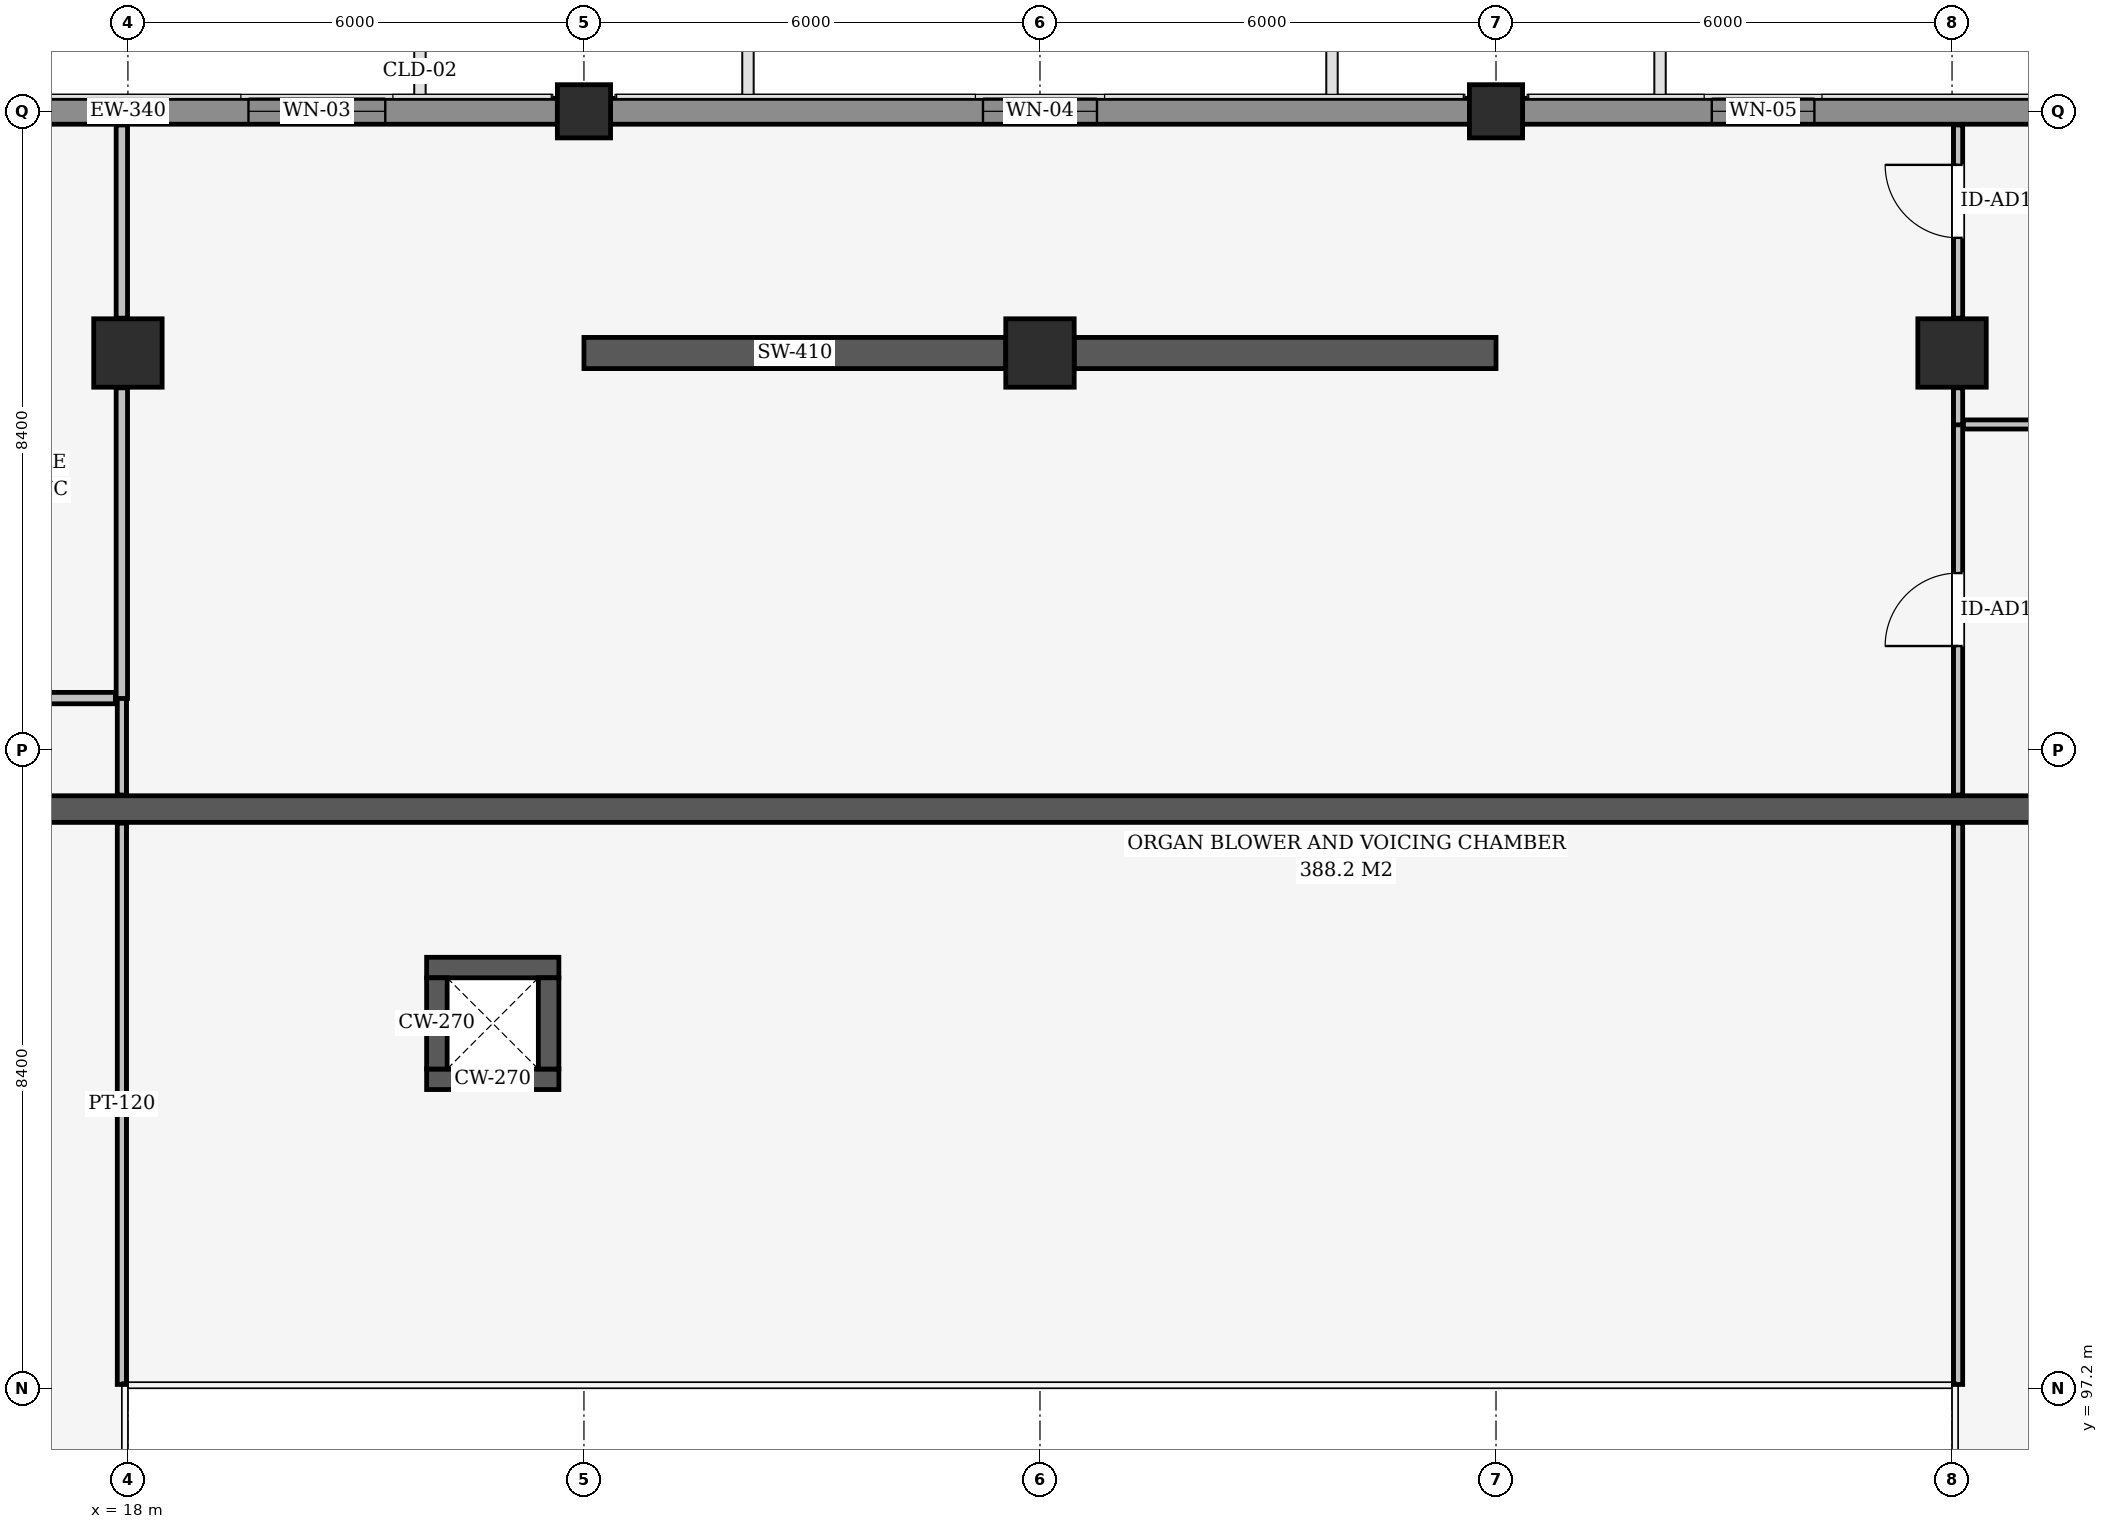
"""IFC4 building model, lengths in metres.
Left out: names, types, materials, properties, quantities, classifications, styles, units other than length and angle.
Written with IfcOpenShell. Run it as: python <this file> out.ifc"""

import sys

from ifc_helpers import new_model, si_unit, direction, frame, frame_2d, origin, origin_2d, place, context, subcontext, project, spatial, rectangle, extrude, element, fill, save


model = new_model("IFC4")
c1 = context("Model", 3, precision=1e-05, world=origin(), true_north=direction((0.0, 1.0)))
c2 = subcontext(c1, "Body", "Model", "MODEL_VIEW")
j1 = project(units=[si_unit("LENGTHUNIT", "METRE"), si_unit("PLANEANGLEUNIT", "RADIAN")], contexts=[c1])
p1 = place(None, origin())
s1 = spatial("IfcSite", under=j1, at=p1, CompositionType="ELEMENT")
p2 = place(p1, origin())
s2 = spatial("IfcBuilding", under=s1, at=p2, CompositionType="ELEMENT")
p3 = place(p2, frame((0.0, 0.0, 18.3)))
s3 = spatial("IfcBuildingStorey", under=s2, at=p3, CompositionType="ELEMENT", Elevation=18.3)
for number, where, z_axis, x_axis in (
    (1, (24.0, 114.0, 0.0), (0.0, 0.0, 1.0), (1.0, 0.0, 0.0)),
    (2, (36.0, 114.0, 0.0), (0.0, 0.0, 1.0), (1.0, 0.0, 0.0)),
):
    element("IfcColumn", number, at=place(p3, frame(where, z_axis=z_axis, x_axis=x_axis)), inside=s3, PredefinedType="COLUMN", context=c2, shape_type="SweptSolid", body=[
        extrude(rectangle(XDim=0.7, YDim=0.7, at=origin_2d()), origin(), (0.0, 0.0, 1.0), 3.9),
    ])
for number, where, z_axis, x_axis in (
    (3, (18.0, 110.82, 0.0), (0.0, 0.0, 1.0), (1.0, 0.0, 0.0)),
    (4, (30.0, 110.82, 0.0), (0.0, 0.0, 1.0), (1.0, 0.0, 0.0)),
    (5, (42.0, 110.82, 0.0), (0.0, 0.0, 1.0), (1.0, 0.0, 0.0)),
):
    element("IfcColumn", number, at=place(p3, frame(where, z_axis=z_axis, x_axis=x_axis)), inside=s3, PredefinedType="COLUMN", context=c2, shape_type="SweptSolid", body=[
        extrude(rectangle(XDim=0.9, YDim=0.9, at=origin_2d()), origin(), (0.0, 0.0, 1.0), 2.3),
    ])
p4 = place(p3, frame((12.005, 104.82, 0.0), z_axis=(0.0, 0.0, 1.0), x_axis=(1.0, 0.0, 0.0)))
e6 = element("IfcWall", 6, at=p4, inside=s3, PredefinedType="SHEAR", context=c2, shape_type="SweptSolid", body=[
    extrude(rectangle(XDim=35.99, YDim=0.35, at=frame_2d((17.995, 0.0))), origin(), (0.0, 0.0, 1.0), 2.39),
])
for number, where, z_axis, x_axis in (
    (7, (24.0, 110.82, 0.0), (0.0, 0.0, 1.0), (1.0, 0.0, 0.0)),
    (8, (30.45, 110.82, 0.0), (0.0, 0.0, 1.0), (1.0, 0.0, 0.0)),
):
    element("IfcWall", number, at=place(p3, frame(where, z_axis=z_axis, x_axis=x_axis)), inside=s3, PredefinedType="SHEAR", context=c2, shape_type="SweptSolid", body=[
        extrude(rectangle(XDim=5.55, YDim=0.41, at=frame_2d((2.775, 0.0))), origin(), (0.0, 0.0, 1.0), 2.3),
    ])
p5 = place(p3, frame((12.35, 114.0, 0.0), z_axis=(0.0, 0.0, 1.0), x_axis=(1.0, 0.0, 0.0)))
e9 = element("IfcWall", 9, at=p5, inside=s3, PredefinedType="SOLIDWALL", context=c2, shape_type="SweptSolid", body=[
    extrude(rectangle(XDim=11.3, YDim=0.34, at=frame_2d((5.65, 0.0))), origin(), (0.0, 0.0, 1.0), 3.9),
])
p6 = place(p5, frame((7.236, 0.0, 0.85)))
e10 = element("IfcOpeningElement", 10, at=p6, cuts=e9, PredefinedType="OPENING", context=c2, shape_type="SweptSolid", body=[
    extrude(rectangle(XDim=1.8, YDim=1.65, at=frame_2d((0.9, 0.825))), frame((0.0, 0.18, 0.0), z_axis=(0.0, -1.0, 0.0), x_axis=(1.0, 0.0, 0.0)), (0.0, 0.0, 1.0), 0.36),
])
p7 = place(p3, frame((24.35, 114.0, 0.0), z_axis=(0.0, 0.0, 1.0), x_axis=(1.0, 0.0, 0.0)))
e11 = element("IfcWall", 11, at=p7, inside=s3, PredefinedType="SOLIDWALL", context=c2, shape_type="SweptSolid", body=[
    extrude(rectangle(XDim=11.3, YDim=0.34, at=frame_2d((5.65, 0.0))), origin(), (0.0, 0.0, 1.0), 3.9),
])
p8 = place(p7, frame((4.9, 0.0, 0.85)))
e12 = element("IfcOpeningElement", 12, at=p8, cuts=e11, PredefinedType="OPENING", context=c2, shape_type="SweptSolid", body=[
    extrude(rectangle(XDim=1.5, YDim=1.65, at=frame_2d((0.75, 0.825))), frame((0.0, 0.18, 0.0), z_axis=(0.0, -1.0, 0.0), x_axis=(1.0, 0.0, 0.0)), (0.0, 0.0, 1.0), 0.36),
])
p9 = place(p3, frame((36.35, 114.0, 0.0), z_axis=(0.0, 0.0, 1.0), x_axis=(1.0, 0.0, 0.0)))
e13 = element("IfcWall", 13, at=p9, inside=s3, PredefinedType="SOLIDWALL", context=c2, shape_type="SweptSolid", body=[
    extrude(rectangle(XDim=11.3, YDim=0.34, at=frame_2d((5.65, 0.0))), origin(), (0.0, 0.0, 1.0), 3.9),
])
p10 = place(p9, frame((2.489, 0.0, 0.85)))
e14 = element("IfcOpeningElement", 14, at=p10, cuts=e13, PredefinedType="OPENING", context=c2, shape_type="SweptSolid", body=[
    extrude(rectangle(XDim=1.35, YDim=1.5, at=frame_2d((0.675, 0.75))), frame((0.0, 0.18, 0.0), z_axis=(0.0, -1.0, 0.0), x_axis=(1.0, 0.0, 0.0)), (0.0, 0.0, 1.0), 0.36),
])
for number, where, z_axis, x_axis in (
    (15, (21.93, 101.265, 0.0), (0.0, 0.0, 1.0), (1.0, 0.0, 0.0)),
    (16, (21.93, 102.735, 0.0), (0.0, 0.0, 1.0), (1.0, 0.0, 0.0)),
):
    element("IfcWall", number, at=place(p3, frame(where, z_axis=z_axis, x_axis=x_axis)), inside=s3, PredefinedType="SHEAR", context=c2, shape_type="SweptSolid", body=[
        extrude(rectangle(XDim=1.74, YDim=0.27, at=frame_2d((0.87, 0.0))), origin(), (0.0, 0.0, 1.0), 3.9),
    ])
for number, where, z_axis, x_axis in (
    (17, (22.065, 101.4, 0.0), (0.0, 0.0, 1.0), (0.0, 1.0, 0.0)),
    (18, (23.535, 101.4, 0.0), (0.0, 0.0, 1.0), (0.0, 1.0, 0.0)),
):
    element("IfcWall", number, at=place(p3, frame(where, z_axis=z_axis, x_axis=x_axis)), inside=s3, PredefinedType="SHEAR", context=c2, shape_type="SweptSolid", body=[
        extrude(rectangle(XDim=1.2, YDim=0.27, at=frame_2d((0.6, 0.0))), origin(), (0.0, 0.0, 1.0), 3.9),
    ])
p11 = place(p3, frame((17.92, 97.25, 0.0), z_axis=(0.0, 0.0, 1.0), x_axis=(0.0, 1.0, 0.0)))
e19 = element("IfcWall", 19, at=p11, inside=s3, PredefinedType="PARTITIONING", context=c2, shape_type="SweptSolid", body=[
    extrude(rectangle(XDim=7.385, YDim=0.12, at=frame_2d((3.692, 0.0))), origin(), (0.0, 0.0, 1.0), 3.9),
])
p12 = place(p3, frame((17.92, 105.005, 0.0), z_axis=(0.0, 0.0, 1.0), x_axis=(0.0, 1.0, 0.0)))
e20 = element("IfcWall", 20, at=p12, inside=s3, PredefinedType="PARTITIONING", context=c2, shape_type="SweptSolid", body=[
    extrude(rectangle(XDim=1.28, YDim=0.12, at=frame_2d((0.64, 0.0))), origin(), (0.0, 0.0, 1.0), 3.9),
])
p13 = place(p3, frame((17.92, 106.275, 0.0), z_axis=(0.0, 0.0, 1.0), x_axis=(0.0, 1.0, 0.0)))
e21 = element("IfcWall", 21, at=p13, inside=s3, PredefinedType="PARTITIONING", context=c2, shape_type="SweptSolid", body=[
    extrude(rectangle(XDim=4.087, YDim=0.15, at=frame_2d((2.043, 0.0))), origin(), (0.0, 0.0, 1.0), 3.9),
])
p14 = place(p3, frame((17.92, 111.278, 0.0), z_axis=(0.0, 0.0, 1.0), x_axis=(0.0, 1.0, 0.0)))
e22 = element("IfcWall", 22, at=p14, inside=s3, PredefinedType="PARTITIONING", context=c2, shape_type="SweptSolid", body=[
    extrude(rectangle(XDim=2.542, YDim=0.15, at=frame_2d((1.271, 0.0))), origin(), (0.0, 0.0, 1.0), 3.9),
])
p15 = place(p3, frame((42.08, 97.25, 0.0), z_axis=(0.0, 0.0, 1.0), x_axis=(0.0, 1.0, 0.0)))
e23 = element("IfcWall", 23, at=p15, inside=s3, PredefinedType="PARTITIONING", context=c2, shape_type="SweptSolid", body=[
    extrude(rectangle(XDim=7.385, YDim=0.12, at=frame_2d((3.692, 0.0))), origin(), (0.0, 0.0, 1.0), 3.9),
])
p16 = place(p3, frame((42.08, 105.005, 0.0), z_axis=(0.0, 0.0, 1.0), x_axis=(0.0, 1.0, 0.0)))
e24 = element("IfcWall", 24, at=p16, inside=s3, PredefinedType="PARTITIONING", context=c2, shape_type="SweptSolid", body=[
    extrude(rectangle(XDim=4.88, YDim=0.12, at=frame_2d((2.44, 0.0))), origin(), (0.0, 0.0, 1.0), 3.9),
])
p17 = place(p16, frame((1.96, 0.0, 0.0)))
e25 = element("IfcOpeningElement", 25, at=p17, cuts=e24, PredefinedType="OPENING", context=c2, shape_type="SweptSolid", body=[
    extrude(rectangle(XDim=0.96, YDim=2.16, at=frame_2d((0.48, 1.08))), frame((0.0, 0.07, 0.0), z_axis=(0.0, -1.0, 0.0), x_axis=(1.0, 0.0, 0.0)), (0.0, 0.0, 1.0), 0.14),
])
p18 = place(p3, frame((42.08, 109.875, 0.0), z_axis=(0.0, 0.0, 1.0), x_axis=(0.0, 1.0, 0.0)))
e26 = element("IfcWall", 26, at=p18, inside=s3, PredefinedType="PARTITIONING", context=c2, shape_type="SweptSolid", body=[
    extrude(rectangle(XDim=0.487, YDim=0.12, at=frame_2d((0.244, 0.0))), origin(), (0.0, 0.0, 1.0), 3.9),
])
p19 = place(p3, frame((42.08, 111.278, 0.0), z_axis=(0.0, 0.0, 1.0), x_axis=(0.0, 1.0, 0.0)))
e27 = element("IfcWall", 27, at=p19, inside=s3, PredefinedType="PARTITIONING", context=c2, shape_type="SweptSolid", body=[
    extrude(rectangle(XDim=2.542, YDim=0.12, at=frame_2d((1.271, 0.0))), origin(), (0.0, 0.0, 1.0), 3.9),
])
p20 = place(p19, frame((1.057, 0.0, 0.0)))
e28 = element("IfcOpeningElement", 28, at=p20, cuts=e27, PredefinedType="OPENING", context=c2, shape_type="SweptSolid", body=[
    extrude(rectangle(XDim=0.96, YDim=2.16, at=frame_2d((0.48, 1.08))), frame((0.0, 0.07, 0.0), z_axis=(0.0, -1.0, 0.0), x_axis=(1.0, 0.0, 0.0)), (0.0, 0.0, 1.0), 0.14),
])
p21 = place(p3, frame((14.575, 106.28, 0.0), z_axis=(0.0, 0.0, 1.0), x_axis=(1.0, 0.0, 0.0)))
e29 = element("IfcWall", 29, at=p21, inside=s3, PredefinedType="PARTITIONING", context=c2, shape_type="SweptSolid", body=[
    extrude(rectangle(XDim=3.26, YDim=0.15, at=frame_2d((1.63, 0.0))), origin(), (0.0, 0.0, 1.0), 3.54),
])
p22 = place(p21, frame((1.16, 0.0, 0.0)))
e30 = element("IfcOpeningElement", 30, at=p22, cuts=e29, PredefinedType="OPENING", context=c2, shape_type="SweptSolid", body=[
    extrude(rectangle(XDim=0.94, YDim=2.1, at=frame_2d((0.47, 1.05))), frame((0.0, 0.085, 0.0), z_axis=(0.0, -1.0, 0.0), x_axis=(1.0, 0.0, 0.0)), (0.0, 0.0, 1.0), 0.17),
])
p23 = place(p3, frame((42.15, 109.88, 0.0), z_axis=(0.0, 0.0, 1.0), x_axis=(1.0, 0.0, 0.0)))
e31 = element("IfcWall", 31, at=p23, inside=s3, PredefinedType="PARTITIONING", context=c2, shape_type="SweptSolid", body=[
    extrude(rectangle(XDim=17.67, YDim=0.12, at=frame_2d((8.835, 0.0))), origin(), (0.0, 0.0, 1.0), 3.54),
])
p24 = place(p23, frame((3.927, 0.0, 0.0)))
e32 = element("IfcOpeningElement", 32, at=p24, cuts=e31, PredefinedType="OPENING", context=c2, shape_type="SweptSolid", body=[
    extrude(rectangle(XDim=0.96, YDim=2.16, at=frame_2d((0.48, 1.08))), frame((0.0, 0.07, 0.0), z_axis=(0.0, -1.0, 0.0), x_axis=(1.0, 0.0, 0.0)), (0.0, 0.0, 1.0), 0.14),
])
p25 = place(p6, origin())
e33 = element("IfcWindow", 33, at=p25, inside=s3, PartitioningType="SINGLE_PANEL", PredefinedType="WINDOW", context=c2, shape_type="SweptSolid", body=[
    extrude(rectangle(XDim=1.8, YDim=1.65, at=frame_2d((0.9, 0.825))), frame((0.0, 0.03, 0.0), z_axis=(0.0, -1.0, 0.0), x_axis=(1.0, 0.0, 0.0)), (0.0, 0.0, 1.0), 0.06),
])
fill(e10, e33)
p26 = place(p8, origin())
e34 = element("IfcWindow", 34, at=p26, inside=s3, PartitioningType="SINGLE_PANEL", PredefinedType="WINDOW", context=c2, shape_type="SweptSolid", body=[
    extrude(rectangle(XDim=1.5, YDim=1.65, at=frame_2d((0.75, 0.825))), frame((0.0, 0.03, 0.0), z_axis=(0.0, -1.0, 0.0), x_axis=(1.0, 0.0, 0.0)), (0.0, 0.0, 1.0), 0.06),
])
fill(e12, e34)
p27 = place(p10, origin())
e35 = element("IfcWindow", 35, at=p27, inside=s3, PartitioningType="SINGLE_PANEL", PredefinedType="WINDOW", context=c2, shape_type="SweptSolid", body=[
    extrude(rectangle(XDim=1.35, YDim=1.5, at=frame_2d((0.675, 0.75))), frame((0.0, 0.03, 0.0), z_axis=(0.0, -1.0, 0.0), x_axis=(1.0, 0.0, 0.0)), (0.0, 0.0, 1.0), 0.06),
])
fill(e14, e35)
p28 = place(p17, origin())
e36 = element("IfcDoor", 36, at=p28, inside=s3, OperationType="SINGLE_SWING_LEFT", PredefinedType="DOOR", context=c2, shape_type="SweptSolid", body=[
    extrude(rectangle(XDim=0.96, YDim=2.16, at=frame_2d((0.48, 1.08))), frame((0.0, 0.025, 0.0), z_axis=(0.0, -1.0, 0.0), x_axis=(1.0, 0.0, 0.0)), (0.0, 0.0, 1.0), 0.05),
])
fill(e25, e36)
p29 = place(p20, origin())
e37 = element("IfcDoor", 37, at=p29, inside=s3, OperationType="SINGLE_SWING_RIGHT", PredefinedType="DOOR", context=c2, shape_type="SweptSolid", body=[
    extrude(rectangle(XDim=0.96, YDim=2.16, at=frame_2d((0.48, 1.08))), frame((0.0, 0.025, 0.0), z_axis=(0.0, -1.0, 0.0), x_axis=(1.0, 0.0, 0.0)), (0.0, 0.0, 1.0), 0.05),
])
fill(e28, e37)
save(model, sys.argv[1])
